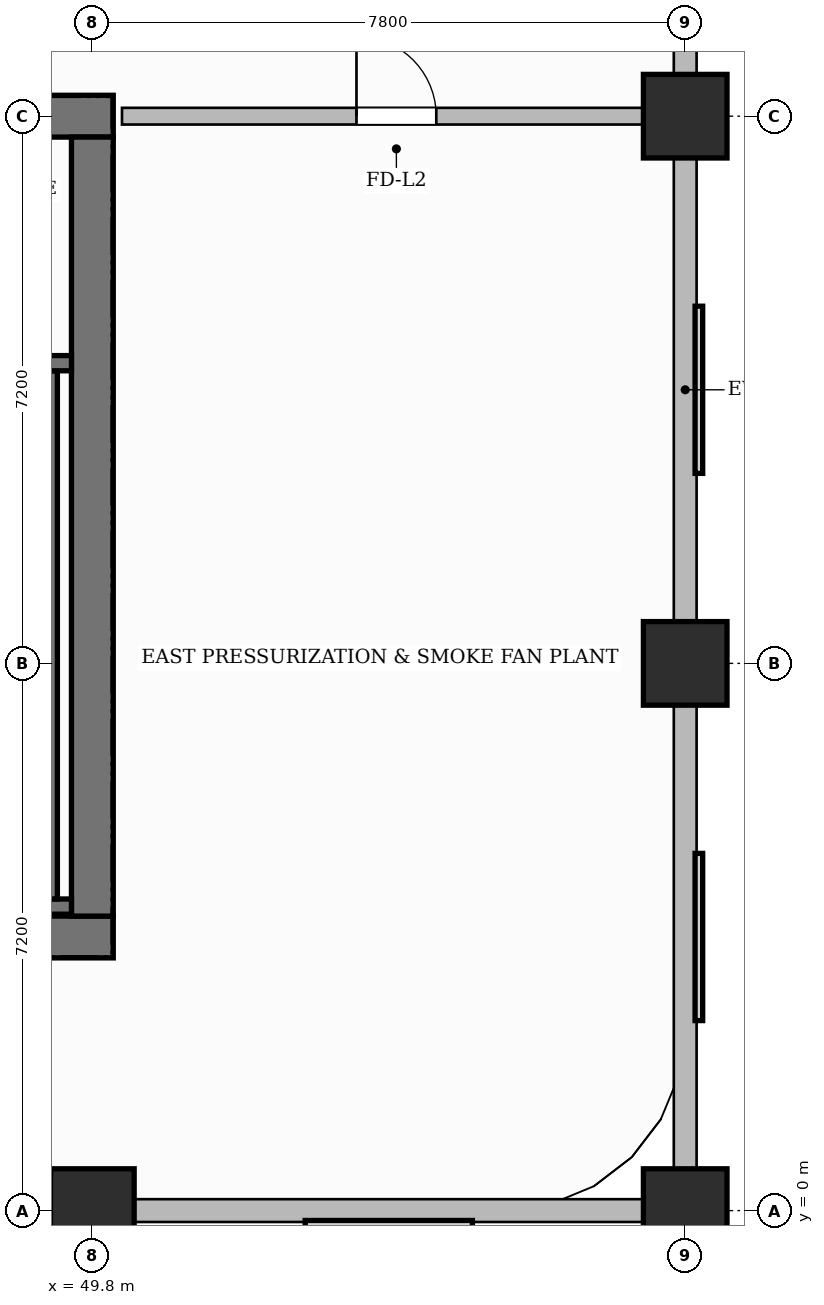
"""IFC4 building model, lengths in metres.
Left out: names, types, materials, properties, quantities, classifications, styles, units other than length and angle.
Written with IfcOpenShell. Run it as: python <this file> out.ifc"""

import sys

from ifc_helpers import new_model, si_unit, direction, frame, frame_2d, origin, origin_2d, place, context, subcontext, project, spatial, rectangle, extrude, source, transform, mapped, element, fill, save


model = new_model("IFC4")
c1 = context("Model", 3, precision=1e-05, world=origin(), true_north=direction((0.0, 1.0)))
c2 = subcontext(c1, "Body", "Model", "MODEL_VIEW")
j1 = project(units=[si_unit("LENGTHUNIT", "METRE"), si_unit("PLANEANGLEUNIT", "RADIAN")], contexts=[c1])
p1 = place(None, origin())
s1 = spatial("IfcSite", under=j1, at=p1, CompositionType="ELEMENT")
p2 = place(p1, origin())
s2 = spatial("IfcBuilding", under=s1, at=p2, CompositionType="ELEMENT")
p3 = place(p2, frame((0.0, 0.0, 106.4)))
s3 = spatial("IfcBuildingStorey", under=s2, at=p3, CompositionType="ELEMENT", Elevation=106.4)
p4 = place(p3, frame((34.525, 3.6, 0.0), z_axis=(0.0, 0.0, 1.0), x_axis=(1.0, 0.0, 0.0)))
e1 = element("IfcWall", 1, at=p4, inside=s3, PredefinedType="SHEAR", context=c2, shape_type="SweptSolid", body=[
    extrude(rectangle(XDim=15.55, YDim=0.55, at=frame_2d((7.775, 0.0))), origin(), (0.0, 0.0, 1.0), 5.4),
])
p5 = place(p4, frame((4.475, 0.0, 0.0)))
e2 = element("IfcOpeningElement", 2, at=p5, cuts=e1, PredefinedType="OPENING", context=c2, shape_type="SweptSolid", body=[
    extrude(rectangle(XDim=0.9, YDim=2.1, at=frame_2d((0.45, 1.05))), frame((0.0, 0.285, 0.0), z_axis=(0.0, -1.0, 0.0), x_axis=(1.0, 0.0, 0.0)), (0.0, 0.0, 1.0), 0.57),
])
p6 = place(p4, frame((6.925, 0.0, 0.0)))
e3 = element("IfcOpeningElement", 3, at=p6, cuts=e1, PredefinedType="OPENING", context=c2, shape_type="SweptSolid", body=[
    extrude(rectangle(XDim=0.9, YDim=2.1, at=frame_2d((0.45, 1.05))), frame((0.0, 0.285, 0.0), z_axis=(0.0, -1.0, 0.0), x_axis=(1.0, 0.0, 0.0)), (0.0, 0.0, 1.0), 0.57),
])
p7 = place(p3, frame((34.525, 14.4, 0.0), z_axis=(0.0, 0.0, 1.0), x_axis=(1.0, 0.0, 0.0)))
e4 = element("IfcWall", 4, at=p7, inside=s3, PredefinedType="SHEAR", context=c2, shape_type="SweptSolid", body=[
    extrude(rectangle(XDim=15.55, YDim=0.55, at=frame_2d((7.775, 0.0))), origin(), (0.0, 0.0, 1.0), 5.4),
])
p8 = place(p7, frame((5.405, 0.0, 0.0)))
e5 = element("IfcOpeningElement", 5, at=p8, cuts=e4, PredefinedType="OPENING", context=c2, shape_type="SweptSolid", body=[
    extrude(rectangle(XDim=1.5, YDim=2.2, at=frame_2d((0.75, 1.1))), frame((0.0, 0.285, 0.0), z_axis=(0.0, -1.0, 0.0), x_axis=(1.0, 0.0, 0.0)), (0.0, 0.0, 1.0), 0.57),
])
p9 = place(p7, frame((1.62, 0.0, 0.0)))
e6 = element("IfcOpeningElement", 6, at=p9, cuts=e4, PredefinedType="OPENING", context=c2, shape_type="SweptSolid", body=[
    extrude(rectangle(XDim=1.05, YDim=2.15, at=frame_2d((0.525, 1.075))), frame((0.0, 0.285, 0.0), z_axis=(0.0, -1.0, 0.0), x_axis=(1.0, 0.0, 0.0)), (0.0, 0.0, 1.0), 0.57),
])
p10 = place(p7, frame((11.25, 0.0, 0.0)))
e7 = element("IfcOpeningElement", 7, at=p10, cuts=e4, PredefinedType="OPENING", context=c2, shape_type="SweptSolid", body=[
    extrude(rectangle(XDim=1.05, YDim=2.15, at=frame_2d((0.525, 1.075))), frame((0.0, 0.285, 0.0), z_axis=(0.0, -1.0, 0.0), x_axis=(1.0, 0.0, 0.0)), (0.0, 0.0, 1.0), 0.57),
])
p11 = place(p3, frame((49.8, 3.875, 0.0), z_axis=(0.0, 0.0, 1.0), x_axis=(0.0, 1.0, 0.0)))
e8 = element("IfcWall", 8, at=p11, inside=s3, PredefinedType="SHEAR", context=c2, shape_type="SweptSolid", body=[
    extrude(rectangle(XDim=10.25, YDim=0.55, at=frame_2d((5.125, 0.0))), origin(), (0.0, 0.0, 1.0), 5.4),
])
m1 = source(origin(), c2, "Body", "SweptSolid", [
    extrude(rectangle(XDim=1.1, YDim=1.1, at=origin_2d()), origin(), (0.0, 0.0, 1.0), 5.4),
])
for number, where, z_axis, x_axis in (
    (9, (49.8, 0.0, 0.0), (0.0, 0.0, 1.0), (1.0, 0.0, 0.0)),
    (10, (57.6, 0.0, 0.0), (0.0, 0.0, 1.0), (1.0, 0.0, 0.0)),
    (11, (57.6, 7.2, 0.0), (0.0, 0.0, 1.0), (1.0, 0.0, 0.0)),
    (12, (57.6, 14.4, 0.0), (0.0, 0.0, 1.0), (1.0, 0.0, 0.0)),
):
    element("IfcColumn", number, at=place(p3, frame(where, z_axis=z_axis, x_axis=x_axis)), inside=s3, PredefinedType="COLUMN", context=c2, shape_type="MappedRepresentation", body=[
        mapped(m1, transform((0.0, 0.0, 0.0), scale=1.0)),
    ])
p12 = place(p3, frame((43.12, 4.0, 0.0), z_axis=(0.0, 0.0, 1.0), x_axis=(1.0, 0.0, 0.0)))
e13 = element("IfcWall", 13, at=p12, inside=s3, PredefinedType="SHEAR", context=c2, shape_type="SweptSolid", body=[
    extrude(rectangle(XDim=6.405, YDim=0.2, at=frame_2d((3.202, 0.0))), origin(), (0.0, 0.0, 1.0), 5.4),
])
p13 = place(p3, frame((49.24, 4.1, 0.0), z_axis=(0.0, 0.0, 1.0), x_axis=(0.0, 1.0, 0.0)))
e14 = element("IfcWall", 14, at=p13, inside=s3, PredefinedType="SHEAR", context=c2, shape_type="SweptSolid", body=[
    extrude(rectangle(XDim=6.95, YDim=0.2, at=frame_2d((3.475, 0.0))), origin(), (0.0, 0.0, 1.0), 5.4),
])
p14 = place(p3, frame((43.12, 11.15, 0.0), z_axis=(0.0, 0.0, 1.0), x_axis=(1.0, 0.0, 0.0)))
e15 = element("IfcWall", 15, at=p14, inside=s3, PredefinedType="SHEAR", context=c2, shape_type="SweptSolid", body=[
    extrude(rectangle(XDim=6.405, YDim=0.2, at=frame_2d((3.202, 0.0))), origin(), (0.0, 0.0, 1.0), 5.4),
])
p15 = place(p14, frame((1.045, 0.0, 0.0)))
e16 = element("IfcOpeningElement", 16, at=p15, cuts=e15, PredefinedType="OPENING", context=c2, shape_type="SweptSolid", body=[
    extrude(rectangle(XDim=1.05, YDim=2.2, at=frame_2d((0.525, 1.1))), frame((0.0, 0.11, 0.0), z_axis=(0.0, -1.0, 0.0), x_axis=(1.0, 0.0, 0.0)), (0.0, 0.0, 1.0), 0.22),
])
p16 = place(p14, frame((4.125, 0.0, 0.0)))
e17 = element("IfcOpeningElement", 17, at=p16, cuts=e15, PredefinedType="OPENING", context=c2, shape_type="SweptSolid", body=[
    extrude(rectangle(XDim=1.05, YDim=2.2, at=frame_2d((0.525, 1.1))), frame((0.0, 0.11, 0.0), z_axis=(0.0, -1.0, 0.0), x_axis=(1.0, 0.0, 0.0)), (0.0, 0.0, 1.0), 0.22),
])
p17 = place(p3, frame((50.19, 14.4, 0.0), z_axis=(0.0, 0.0, 1.0), x_axis=(1.0, 0.0, 0.0)))
e18 = element("IfcWall", 18, at=p17, inside=s3, PredefinedType="PARTITIONING", context=c2, shape_type="SweptSolid", body=[
    extrude(rectangle(XDim=7.22, YDim=0.22, at=frame_2d((3.61, 0.0))), origin(), (0.0, 0.0, 1.0), 5.15),
])
p18 = place(p17, frame((3.085, 0.0, 0.0)))
e19 = element("IfcOpeningElement", 19, at=p18, cuts=e18, PredefinedType="OPENING", context=c2, shape_type="SweptSolid", body=[
    extrude(rectangle(XDim=1.05, YDim=2.15, at=frame_2d((0.525, 1.075))), frame((0.0, 0.12, 0.0), z_axis=(0.0, -1.0, 0.0), x_axis=(1.0, 0.0, 0.0)), (0.0, 0.0, 1.0), 0.24),
])
p19 = place(p3, frame((14.4, 0.0, 0.0), z_axis=(0.0, 0.0, 1.0), x_axis=(1.0, 0.0, 0.0)))
e20 = element("IfcWall", 20, at=p19, inside=s3, PredefinedType="SOLIDWALL", context=c2, shape_type="SweptSolid", body=[
    extrude(rectangle(XDim=43.2, YDim=0.3, at=frame_2d((21.6, 0.0))), origin(), (0.0, 0.0, 1.0), 4.485),
])
p20 = place(p3, frame((57.6, 0.05, 0.0), z_axis=(0.0, 0.0, 1.0), x_axis=(0.0, 1.0, 0.0)))
e21 = element("IfcWall", 21, at=p20, inside=s3, PredefinedType="SOLIDWALL", context=c2, shape_type="SweptSolid", body=[
    extrude(rectangle(XDim=21.5, YDim=0.3, at=frame_2d((10.75, 0.0))), origin(), (0.0, 0.0, 1.0), 5.15),
])
m2 = source(origin(), c2, "Body", "SweptSolid", [
    extrude(rectangle(XDim=1.05, YDim=2.15, at=frame_2d((0.525, 1.075))), frame((0.0, 0.025, 0.0), z_axis=(0.0, -1.0, 0.0), x_axis=(1.0, 0.0, 0.0)), (0.0, 0.0, 1.0), 0.05),
])
p21 = place(p18, origin())
e22 = element("IfcDoor", 22, at=p21, inside=s3, OperationType="SINGLE_SWING_LEFT", PredefinedType="DOOR", context=c2, shape_type="MappedRepresentation", body=[
    mapped(m2, transform((0.0, 0.0, 0.0), scale=1.0)),
])
fill(e19, e22)
save(model, sys.argv[1])
